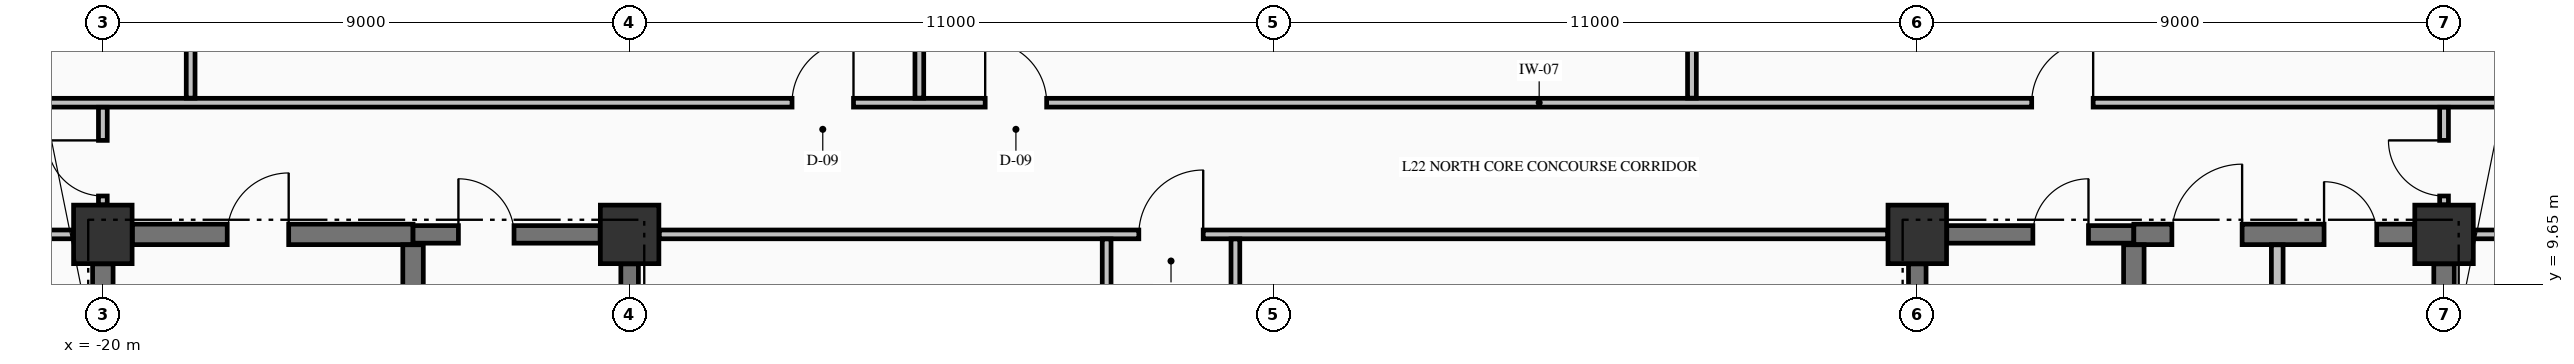
"""IFC4 building model, lengths in metres.
Left out: names, types, materials, properties, quantities, classifications, styles, units other than length and angle.
Written with IfcOpenShell. Run it as: python <this file> out.ifc"""

import sys

from ifc_helpers import new_model, si_unit, direction, frame, frame_2d, origin, origin_2d, place, context, subcontext, project, spatial, rectangle, extrude, element, fill, save


model = new_model("IFC4")
c1 = context("Model", 3, precision=1e-05, world=origin(), true_north=direction((0.0, 1.0)))
c2 = subcontext(c1, "Body", "Model", "MODEL_VIEW")
j1 = project(units=[si_unit("LENGTHUNIT", "METRE"), si_unit("PLANEANGLEUNIT", "RADIAN")], contexts=[c1])
p1 = place(None, origin())
s1 = spatial("IfcSite", under=j1, at=p1, CompositionType="ELEMENT")
p2 = place(p1, origin())
s2 = spatial("IfcBuilding", under=s1, at=p2, CompositionType="ELEMENT")
p3 = place(p2, frame((0.0, 0.0, 91.36)))
s3 = spatial("IfcBuildingStorey", under=s2, at=p3, CompositionType="ELEMENT", Elevation=91.36)
for number, where, z_axis, x_axis in (
    (1, (-20.0, 10.5, -0.25), (0.0, 0.0, 1.0), (1.0, 0.0, 0.0)),
    (2, (-11.0, 10.5, -0.25), (0.0, 0.0, 1.0), (1.0, 0.0, 0.0)),
    (3, (11.0, 10.5, -0.25), (0.0, 0.0, 1.0), (1.0, 0.0, 0.0)),
    (4, (20.0, 10.5, -0.25), (0.0, 0.0, 1.0), (1.0, 0.0, 0.0)),
):
    element("IfcColumn", number, at=place(p3, frame(where, z_axis=z_axis, x_axis=x_axis)), inside=s3, PredefinedType="COLUMN", context=c2, shape_type="SweptSolid", body=[
        extrude(rectangle(XDim=1.0, YDim=1.0, at=origin_2d()), origin(), (0.0, 0.0, 1.0), 3.57),
    ])
p4 = place(p3, frame((-19.496, 10.5, 0.0), z_axis=(0.0, 0.0, 1.0), x_axis=(1.0, 0.0, 0.0)))
e5 = element("IfcWall", 5, at=p4, inside=s3, PredefinedType="SHEAR", context=c2, shape_type="SweptSolid", body=[
    extrude(rectangle(XDim=4.796, YDim=0.35, at=frame_2d((2.398, 0.0))), origin(), (0.0, 0.0, 1.0), 3.32),
])
p5 = place(p4, frame((1.621, 0.0, 0.0)))
e6 = element("IfcOpeningElement", 6, at=p5, cuts=e5, PredefinedType="OPENING", context=c2, shape_type="SweptSolid", body=[
    extrude(rectangle(XDim=1.05, YDim=2.15, at=frame_2d((0.525, 1.075))), frame((0.0, 0.185, 0.0), z_axis=(0.0, -1.0, 0.0), x_axis=(1.0, 0.0, 0.0)), (0.0, 0.0, 1.0), 0.37),
])
p6 = place(p3, frame((-14.7, 10.5, 0.0), z_axis=(0.0, 0.0, 1.0), x_axis=(1.0, 0.0, 0.0)))
e7 = element("IfcWall", 7, at=p6, inside=s3, PredefinedType="SHEAR", context=c2, shape_type="SweptSolid", body=[
    extrude(rectangle(XDim=3.196, YDim=0.3, at=frame_2d((1.598, 0.0))), origin(), (0.0, 0.0, 1.0), 3.32),
])
p7 = place(p6, frame((0.775, 0.0, 0.0)))
e8 = element("IfcOpeningElement", 8, at=p7, cuts=e7, PredefinedType="OPENING", context=c2, shape_type="SweptSolid", body=[
    extrude(rectangle(XDim=0.95, YDim=2.15, at=frame_2d((0.475, 1.075))), frame((0.0, 0.16, 0.0), z_axis=(0.0, -1.0, 0.0), x_axis=(1.0, 0.0, 0.0)), (0.0, 0.0, 1.0), 0.32),
])
p8 = place(p3, frame((11.504, 10.5, 0.0), z_axis=(0.0, 0.0, 1.0), x_axis=(1.0, 0.0, 0.0)))
e9 = element("IfcWall", 9, at=p8, inside=s3, PredefinedType="SHEAR", context=c2, shape_type="SweptSolid", body=[
    extrude(rectangle(XDim=3.196, YDim=0.3, at=frame_2d((1.598, 0.0))), origin(), (0.0, 0.0, 1.0), 3.32),
])
p9 = place(p8, frame((1.471, 0.0, 0.0)))
e10 = element("IfcOpeningElement", 10, at=p9, cuts=e9, PredefinedType="OPENING", context=c2, shape_type="SweptSolid", body=[
    extrude(rectangle(XDim=0.95, YDim=2.15, at=frame_2d((0.475, 1.075))), frame((0.0, 0.16, 0.0), z_axis=(0.0, -1.0, 0.0), x_axis=(1.0, 0.0, 0.0)), (0.0, 0.0, 1.0), 0.32),
])
p10 = place(p3, frame((14.7, 10.5, 0.0), z_axis=(0.0, 0.0, 1.0), x_axis=(1.0, 0.0, 0.0)))
e11 = element("IfcWall", 11, at=p10, inside=s3, PredefinedType="SHEAR", context=c2, shape_type="SweptSolid", body=[
    extrude(rectangle(XDim=4.796, YDim=0.35, at=frame_2d((2.398, 0.0))), origin(), (0.0, 0.0, 1.0), 3.32),
])
p11 = place(p10, frame((0.65, 0.0, 0.0)))
e12 = element("IfcOpeningElement", 12, at=p11, cuts=e11, PredefinedType="OPENING", context=c2, shape_type="SweptSolid", body=[
    extrude(rectangle(XDim=1.2, YDim=2.15, at=frame_2d((0.6, 1.075))), frame((0.0, 0.185, 0.0), z_axis=(0.0, -1.0, 0.0), x_axis=(1.0, 0.0, 0.0)), (0.0, 0.0, 1.0), 0.37),
])
p12 = place(p10, frame((3.25, 0.0, 0.0)))
e13 = element("IfcOpeningElement", 13, at=p12, cuts=e11, PredefinedType="OPENING", context=c2, shape_type="SweptSolid", body=[
    extrude(rectangle(XDim=0.9, YDim=2.15, at=frame_2d((0.45, 1.075))), frame((0.0, 0.185, 0.0), z_axis=(0.0, -1.0, 0.0), x_axis=(1.0, 0.0, 0.0)), (0.0, 0.0, 1.0), 0.37),
])
p13 = place(p3, frame((-22.835, 10.5, 0.0), z_axis=(0.0, 0.0, 1.0), x_axis=(1.0, 0.0, 0.0)))
e14 = element("IfcWall", 14, at=p13, inside=s3, PredefinedType="PARTITIONING", context=c2, shape_type="SweptSolid", body=[
    extrude(rectangle(XDim=2.329, YDim=0.15, at=frame_2d((1.165, 0.0))), origin(), (0.0, 0.0, 1.0), 3.32),
])
p14 = place(p13, frame((0.86, 0.0, 0.0)))
e15 = element("IfcOpeningElement", 15, at=p14, cuts=e14, PredefinedType="OPENING", context=c2, shape_type="SweptSolid", body=[
    extrude(rectangle(XDim=0.95, YDim=2.15, at=frame_2d((0.475, 1.075))), frame((0.0, 0.085, 0.0), z_axis=(0.0, -1.0, 0.0), x_axis=(1.0, 0.0, 0.0)), (0.0, 0.0, 1.0), 0.17),
])
p15 = place(p3, frame((-10.494, 10.5, 0.0), z_axis=(0.0, 0.0, 1.0), x_axis=(1.0, 0.0, 0.0)))
e16 = element("IfcWall", 16, at=p15, inside=s3, PredefinedType="PARTITIONING", context=c2, shape_type="SweptSolid", body=[
    extrude(rectangle(XDim=20.988, YDim=0.15, at=frame_2d((10.494, 0.0))), origin(), (0.0, 0.0, 1.0), 3.32),
])
p16 = place(p15, frame((8.194, 0.0, 0.0)))
e17 = element("IfcOpeningElement", 17, at=p16, cuts=e16, PredefinedType="OPENING", context=c2, shape_type="SweptSolid", body=[
    extrude(rectangle(XDim=1.1, YDim=2.15, at=frame_2d((0.55, 1.075))), frame((0.0, 0.085, 0.0), z_axis=(0.0, -1.0, 0.0), x_axis=(1.0, 0.0, 0.0)), (0.0, 0.0, 1.0), 0.17),
])
p17 = place(p3, frame((20.506, 10.5, 0.0), z_axis=(0.0, 0.0, 1.0), x_axis=(1.0, 0.0, 0.0)))
e18 = element("IfcWall", 18, at=p17, inside=s3, PredefinedType="PARTITIONING", context=c2, shape_type="SweptSolid", body=[
    extrude(rectangle(XDim=7.329, YDim=0.15, at=frame_2d((3.665, 0.0))), origin(), (0.0, 0.0, 1.0), 3.32),
])
p18 = place(p17, frame((2.994, 0.0, 0.0)))
e19 = element("IfcOpeningElement", 19, at=p18, cuts=e18, PredefinedType="OPENING", context=c2, shape_type="SweptSolid", body=[
    extrude(rectangle(XDim=1.0, YDim=2.15, at=frame_2d((0.5, 1.075))), frame((0.0, 0.085, 0.0), z_axis=(0.0, -1.0, 0.0), x_axis=(1.0, 0.0, 0.0)), (0.0, 0.0, 1.0), 0.17),
])
p19 = place(p3, frame((-22.835, 12.75, 0.0), z_axis=(0.0, 0.0, 1.0), x_axis=(1.0, 0.0, 0.0)))
e20 = element("IfcWall", 20, at=p19, inside=s3, PredefinedType="PARTITIONING", context=c2, shape_type="SweptSolid", body=[
    extrude(rectangle(XDim=50.67, YDim=0.15, at=frame_2d((25.335, 0.0))), origin(), (0.0, 0.0, 1.0), 3.32),
])
p20 = place(p19, frame((14.61, 0.0, 0.0)))
e21 = element("IfcOpeningElement", 21, at=p20, cuts=e20, PredefinedType="OPENING", context=c2, shape_type="SweptSolid", body=[
    extrude(rectangle(XDim=1.05, YDim=2.15, at=frame_2d((0.525, 1.075))), frame((0.0, 0.085, 0.0), z_axis=(0.0, -1.0, 0.0), x_axis=(1.0, 0.0, 0.0)), (0.0, 0.0, 1.0), 0.17),
])
p21 = place(p19, frame((17.91, 0.0, 0.0)))
e22 = element("IfcOpeningElement", 22, at=p21, cuts=e20, PredefinedType="OPENING", context=c2, shape_type="SweptSolid", body=[
    extrude(rectangle(XDim=1.05, YDim=2.15, at=frame_2d((0.525, 1.075))), frame((0.0, 0.085, 0.0), z_axis=(0.0, -1.0, 0.0), x_axis=(1.0, 0.0, 0.0)), (0.0, 0.0, 1.0), 0.17),
])
p22 = place(p19, frame((35.79, 0.0, 0.0)))
e23 = element("IfcOpeningElement", 23, at=p22, cuts=e20, PredefinedType="OPENING", context=c2, shape_type="SweptSolid", body=[
    extrude(rectangle(XDim=1.05, YDim=2.15, at=frame_2d((0.525, 1.075))), frame((0.0, 0.085, 0.0), z_axis=(0.0, -1.0, 0.0), x_axis=(1.0, 0.0, 0.0)), (0.0, 0.0, 1.0), 0.17),
])
p23 = place(p3, frame((-20.0, 0.504, 0.0), z_axis=(0.0, 0.0, 1.0), x_axis=(0.0, 1.0, 0.0)))
e24 = element("IfcWall", 24, at=p23, inside=s3, PredefinedType="SHEAR", context=c2, shape_type="SweptSolid", body=[
    extrude(rectangle(XDim=9.492, YDim=0.35, at=frame_2d((4.746, 0.0))), origin(), (0.0, 0.0, 1.0), 3.32),
])
p24 = place(p3, frame((-14.7, 5.852, 0.0), z_axis=(0.0, 0.0, 1.0), x_axis=(0.0, 1.0, 0.0)))
e25 = element("IfcWall", 25, at=p24, inside=s3, PredefinedType="SHEAR", context=c2, shape_type="SweptSolid", body=[
    extrude(rectangle(XDim=4.471, YDim=0.35, at=frame_2d((2.235, 0.0))), origin(), (0.0, 0.0, 1.0), 3.32),
])
for number, where, z_axis, x_axis in (
    (26, (-11.0, 5.852, 0.0), (0.0, 0.0, 1.0), (0.0, 1.0, 0.0)),
    (27, (11.0, 5.852, 0.0), (0.0, 0.0, 1.0), (0.0, 1.0, 0.0)),
):
    element("IfcWall", number, at=place(p3, frame(where, z_axis=z_axis, x_axis=x_axis)), inside=s3, PredefinedType="SHEAR", context=c2, shape_type="SweptSolid", body=[
        extrude(rectangle(XDim=4.144, YDim=0.3, at=frame_2d((2.072, 0.0))), origin(), (0.0, 0.0, 1.0), 3.32),
    ])
p25 = place(p3, frame((14.7, 5.852, 0.0), z_axis=(0.0, 0.0, 1.0), x_axis=(0.0, 1.0, 0.0)))
e28 = element("IfcWall", 28, at=p25, inside=s3, PredefinedType="SHEAR", context=c2, shape_type="SweptSolid", body=[
    extrude(rectangle(XDim=4.471, YDim=0.35, at=frame_2d((2.235, 0.0))), origin(), (0.0, 0.0, 1.0), 3.32),
])
p26 = place(p3, frame((20.0, 5.377, 0.0), z_axis=(0.0, 0.0, 1.0), x_axis=(0.0, 1.0, 0.0)))
e29 = element("IfcWall", 29, at=p26, inside=s3, PredefinedType="SHEAR", context=c2, shape_type="SweptSolid", body=[
    extrude(rectangle(XDim=4.619, YDim=0.35, at=frame_2d((2.31, 0.0))), origin(), (0.0, 0.0, 1.0), 3.32),
])
p27 = place(p3, frame((-20.0, 11.006, 0.0), z_axis=(0.0, 0.0, 1.0), x_axis=(0.0, 1.0, 0.0)))
e30 = element("IfcWall", 30, at=p27, inside=s3, PredefinedType="PARTITIONING", context=c2, shape_type="SweptSolid", body=[
    extrude(rectangle(XDim=1.666, YDim=0.15, at=frame_2d((0.833, 0.0))), origin(), (0.0, 0.0, 1.0), 2.81),
])
p28 = place(p27, frame((0.15, 0.0, 0.0)))
e31 = element("IfcOpeningElement", 31, at=p28, cuts=e30, PredefinedType="OPENING", context=c2, shape_type="SweptSolid", body=[
    extrude(rectangle(XDim=0.95, YDim=2.15, at=frame_2d((0.475, 1.075))), frame((0.0, 0.085, 0.0), z_axis=(0.0, -1.0, 0.0), x_axis=(1.0, 0.0, 0.0)), (0.0, 0.0, 1.0), 0.17),
])
p29 = place(p3, frame((-18.5, 12.828, 0.0), z_axis=(0.0, 0.0, 1.0), x_axis=(0.0, 1.0, 0.0)))
e32 = element("IfcWall", 32, at=p29, inside=s3, PredefinedType="PARTITIONING", context=c2, shape_type="SweptSolid", body=[
    extrude(rectangle(XDim=7.566, YDim=0.15, at=frame_2d((3.783, 0.0))), origin(), (0.0, 0.0, 1.0), 3.32),
])
p30 = place(p3, frame((-6.05, 12.828, 0.0), z_axis=(0.0, 0.0, 1.0), x_axis=(0.0, 1.0, 0.0)))
e33 = element("IfcWall", 33, at=p30, inside=s3, PredefinedType="PARTITIONING", context=c2, shape_type="SweptSolid", body=[
    extrude(rectangle(XDim=12.507, YDim=0.15, at=frame_2d((6.253, 0.0))), origin(), (0.0, 0.0, 1.0), 3.32),
])
for number, where, z_axis, x_axis in (
    (34, (-2.85, 2.978, 0.0), (0.0, 0.0, 1.0), (0.0, 1.0, 0.0)),
    (35, (-0.65, 2.978, 0.0), (0.0, 0.0, 1.0), (0.0, 1.0, 0.0)),
):
    element("IfcWall", number, at=place(p3, frame(where, z_axis=z_axis, x_axis=x_axis)), inside=s3, PredefinedType="PARTITIONING", context=c2, shape_type="SweptSolid", body=[
        extrude(rectangle(XDim=7.444, YDim=0.15, at=frame_2d((3.722, 0.0))), origin(), (0.0, 0.0, 1.0), 3.32),
    ])
p31 = place(p3, frame((7.15, 12.828, 0.0), z_axis=(0.0, 0.0, 1.0), x_axis=(0.0, 1.0, 0.0)))
e36 = element("IfcWall", 36, at=p31, inside=s3, PredefinedType="PARTITIONING", context=c2, shape_type="SweptSolid", body=[
    extrude(rectangle(XDim=12.507, YDim=0.15, at=frame_2d((6.253, 0.0))), origin(), (0.0, 0.0, 1.0), 3.32),
])
p32 = place(p3, frame((17.15, 5.378, 0.0), z_axis=(0.0, 0.0, 1.0), x_axis=(0.0, 1.0, 0.0)))
e37 = element("IfcWall", 37, at=p32, inside=s3, PredefinedType="PARTITIONING", context=c2, shape_type="SweptSolid", body=[
    extrude(rectangle(XDim=4.944, YDim=0.2, at=frame_2d((2.472, 0.0))), origin(), (0.0, 0.0, 1.0), 3.32),
])
p33 = place(p3, frame((20.0, 11.006, 0.0), z_axis=(0.0, 0.0, 1.0), x_axis=(0.0, 1.0, 0.0)))
e38 = element("IfcWall", 38, at=p33, inside=s3, PredefinedType="PARTITIONING", context=c2, shape_type="SweptSolid", body=[
    extrude(rectangle(XDim=1.666, YDim=0.15, at=frame_2d((0.833, 0.0))), origin(), (0.0, 0.0, 1.0), 2.81),
])
p34 = place(p33, frame((0.15, 0.0, 0.0)))
e39 = element("IfcOpeningElement", 39, at=p34, cuts=e38, PredefinedType="OPENING", context=c2, shape_type="SweptSolid", body=[
    extrude(rectangle(XDim=0.95, YDim=2.15, at=frame_2d((0.475, 1.075))), frame((0.0, 0.085, 0.0), z_axis=(0.0, -1.0, 0.0), x_axis=(1.0, 0.0, 0.0)), (0.0, 0.0, 1.0), 0.17),
])
p35 = place(p7, origin())
e40 = element("IfcDoor", 40, at=p35, inside=s3, OperationType="SINGLE_SWING_LEFT", PredefinedType="DOOR", context=c2, shape_type="SweptSolid", body=[
    extrude(rectangle(XDim=0.95, YDim=2.15, at=frame_2d((0.475, 1.075))), frame((0.0, 0.025, 0.0), z_axis=(0.0, -1.0, 0.0), x_axis=(1.0, 0.0, 0.0)), (0.0, 0.0, 1.0), 0.05),
])
fill(e8, e40)
p36 = place(p9, origin())
e41 = element("IfcDoor", 41, at=p36, inside=s3, OperationType="SINGLE_SWING_RIGHT", PredefinedType="DOOR", context=c2, shape_type="SweptSolid", body=[
    extrude(rectangle(XDim=0.95, YDim=2.15, at=frame_2d((0.475, 1.075))), frame((0.0, 0.025, 0.0), z_axis=(0.0, -1.0, 0.0), x_axis=(1.0, 0.0, 0.0)), (0.0, 0.0, 1.0), 0.05),
])
fill(e10, e41)
p37 = place(p5, origin())
e42 = element("IfcDoor", 42, at=p37, inside=s3, OperationType="SINGLE_SWING_RIGHT", PredefinedType="DOOR", context=c2, shape_type="SweptSolid", body=[
    extrude(rectangle(XDim=1.05, YDim=2.15, at=frame_2d((0.525, 1.075))), frame((0.0, 0.025, 0.0), z_axis=(0.0, -1.0, 0.0), x_axis=(1.0, 0.0, 0.0)), (0.0, 0.0, 1.0), 0.05),
])
fill(e6, e42)
p38 = place(p11, origin())
e43 = element("IfcDoor", 43, at=p38, inside=s3, OperationType="SINGLE_SWING_RIGHT", PredefinedType="DOOR", context=c2, shape_type="SweptSolid", body=[
    extrude(rectangle(XDim=1.2, YDim=2.15, at=frame_2d((0.6, 1.075))), frame((0.0, 0.025, 0.0), z_axis=(0.0, -1.0, 0.0), x_axis=(1.0, 0.0, 0.0)), (0.0, 0.0, 1.0), 0.05),
])
fill(e12, e43)
p39 = place(p12, origin())
e44 = element("IfcDoor", 44, at=p39, inside=s3, OperationType="SINGLE_SWING_LEFT", PredefinedType="DOOR", context=c2, shape_type="SweptSolid", body=[
    extrude(rectangle(XDim=0.9, YDim=2.15, at=frame_2d((0.45, 1.075))), frame((0.0, 0.025, 0.0), z_axis=(0.0, -1.0, 0.0), x_axis=(1.0, 0.0, 0.0)), (0.0, 0.0, 1.0), 0.05),
])
fill(e13, e44)
p40 = place(p16, origin())
e45 = element("IfcDoor", 45, at=p40, inside=s3, OperationType="SINGLE_SWING_RIGHT", PredefinedType="DOOR", context=c2, shape_type="SweptSolid", body=[
    extrude(rectangle(XDim=1.1, YDim=2.15, at=frame_2d((0.55, 1.075))), frame((0.0, 0.025, 0.0), z_axis=(0.0, -1.0, 0.0), x_axis=(1.0, 0.0, 0.0)), (0.0, 0.0, 1.0), 0.05),
])
fill(e17, e45)
p41 = place(p20, origin())
e46 = element("IfcDoor", 46, at=p41, inside=s3, OperationType="SINGLE_SWING_RIGHT", PredefinedType="DOOR", context=c2, shape_type="SweptSolid", body=[
    extrude(rectangle(XDim=1.05, YDim=2.15, at=frame_2d((0.525, 1.075))), frame((0.0, 0.025, 0.0), z_axis=(0.0, -1.0, 0.0), x_axis=(1.0, 0.0, 0.0)), (0.0, 0.0, 1.0), 0.05),
])
fill(e21, e46)
p42 = place(p21, origin())
e47 = element("IfcDoor", 47, at=p42, inside=s3, OperationType="SINGLE_SWING_LEFT", PredefinedType="DOOR", context=c2, shape_type="SweptSolid", body=[
    extrude(rectangle(XDim=1.05, YDim=2.15, at=frame_2d((0.525, 1.075))), frame((0.0, 0.025, 0.0), z_axis=(0.0, -1.0, 0.0), x_axis=(1.0, 0.0, 0.0)), (0.0, 0.0, 1.0), 0.05),
])
fill(e22, e47)
p43 = place(p22, origin())
e48 = element("IfcDoor", 48, at=p43, inside=s3, OperationType="SINGLE_SWING_RIGHT", PredefinedType="DOOR", context=c2, shape_type="SweptSolid", body=[
    extrude(rectangle(XDim=1.05, YDim=2.15, at=frame_2d((0.525, 1.075))), frame((0.0, 0.025, 0.0), z_axis=(0.0, -1.0, 0.0), x_axis=(1.0, 0.0, 0.0)), (0.0, 0.0, 1.0), 0.05),
])
fill(e23, e48)
p44 = place(p28, origin())
e49 = element("IfcDoor", 49, at=p44, inside=s3, OperationType="SINGLE_SWING_RIGHT", PredefinedType="DOOR", context=c2, shape_type="SweptSolid", body=[
    extrude(rectangle(XDim=0.95, YDim=2.15, at=frame_2d((0.475, 1.075))), frame((0.0, 0.025, 0.0), z_axis=(0.0, -1.0, 0.0), x_axis=(1.0, 0.0, 0.0)), (0.0, 0.0, 1.0), 0.05),
])
fill(e31, e49)
p45 = place(p34, origin())
e50 = element("IfcDoor", 50, at=p45, inside=s3, OperationType="SINGLE_SWING_RIGHT", PredefinedType="DOOR", context=c2, shape_type="SweptSolid", body=[
    extrude(rectangle(XDim=0.95, YDim=2.15, at=frame_2d((0.475, 1.075))), frame((0.0, 0.025, 0.0), z_axis=(0.0, -1.0, 0.0), x_axis=(1.0, 0.0, 0.0)), (0.0, 0.0, 1.0), 0.05),
])
fill(e39, e50)
save(model, sys.argv[1])
